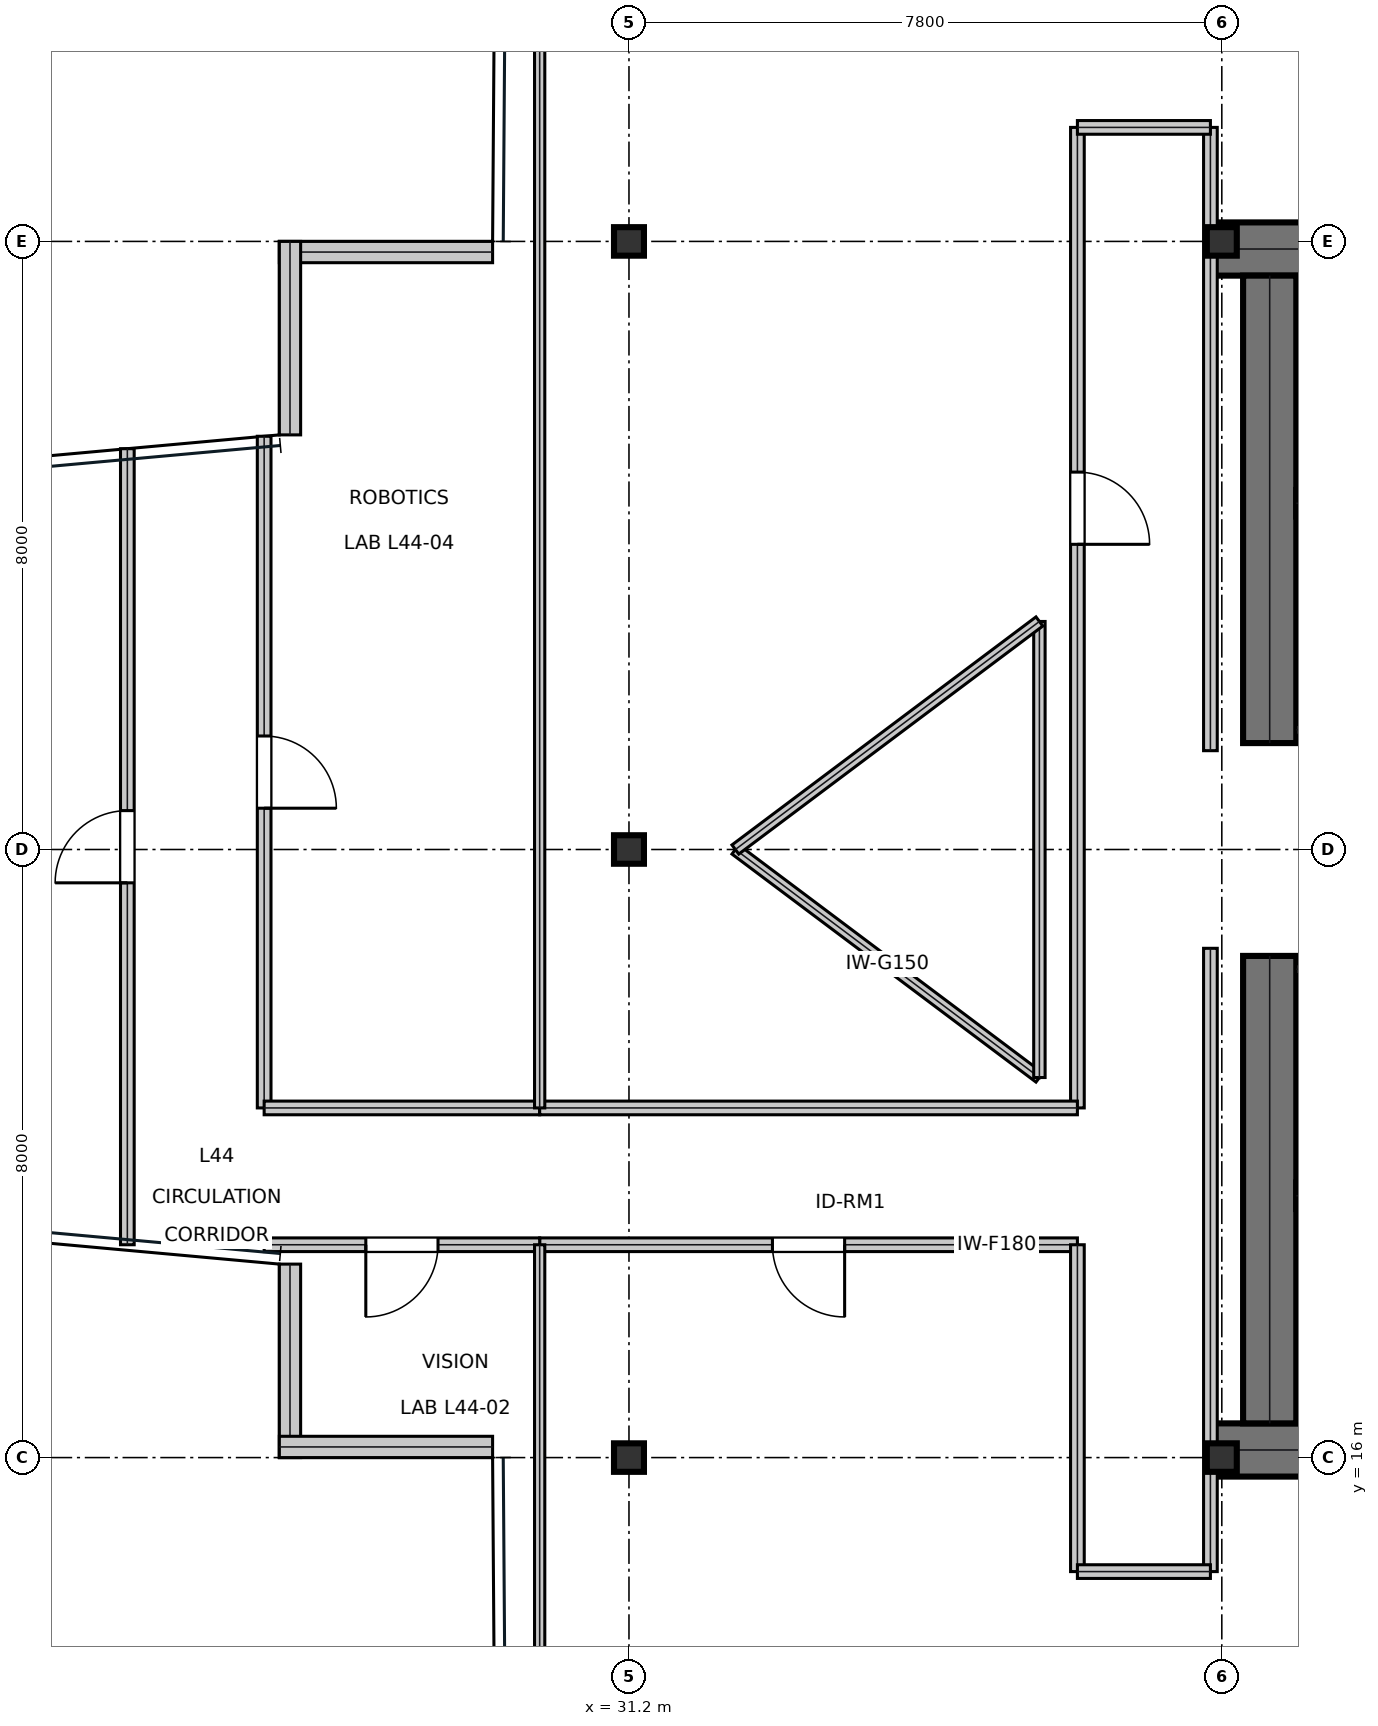
"""IFC4 building model, lengths in metres.
Left out: names, types, materials, properties, quantities, classifications, styles, units other than length and angle.
Written with IfcOpenShell. Run it as: python <this file> out.ifc"""

import sys

from ifc_helpers import new_model, si_unit, direction, frame, frame_2d, origin, origin_2d, place, context, subcontext, project, spatial, rectangle, i_section, extrude, element, fill, save


model = new_model("IFC4")
c1 = context("Model", 3, precision=1e-05, world=origin(), true_north=direction((0.0, 1.0)))
c2 = subcontext(c1, "Body", "Model", "MODEL_VIEW")
j1 = project(units=[si_unit("LENGTHUNIT", "METRE"), si_unit("PLANEANGLEUNIT", "RADIAN")], contexts=[c1])
p1 = place(None, origin())
s1 = spatial("IfcSite", under=j1, at=p1, CompositionType="ELEMENT")
p2 = place(p1, origin())
s2 = spatial("IfcBuilding", under=s1, at=p2, CompositionType="ELEMENT")
p3 = place(p2, frame((0.0, 0.0, 191.85)))
s3 = spatial("IfcBuildingStorey", under=s2, at=p3, CompositionType="ELEMENT", Elevation=191.85)
for number, where, z_axis, x_axis in (
    (1, (38.8, 31.9, 0.0), (0.0, 0.0, 1.0), (1.0, 0.0, 0.0)),
    (2, (38.8, 16.1, 0.0), (0.0, 0.0, 1.0), (1.0, 0.0, 0.0)),
):
    element("IfcWall", number, at=place(p3, frame(where, z_axis=z_axis, x_axis=x_axis)), inside=s3, PredefinedType="SHEAR", context=c2, shape_type="SweptSolid", body=[
        extrude(rectangle(XDim=16.0, YDim=0.7, at=frame_2d((8.0, 0.0))), origin(), (0.0, 0.0, 1.0), 3.79),
    ])
for number, where, z_axis, x_axis in (
    (3, (39.63, 16.45, 0.0), (0.0, 0.0, 1.0), (0.0, 1.0, 0.0)),
    (4, (39.63, 25.4, 0.0), (0.0, 0.0, 1.0), (0.0, 1.0, 0.0)),
):
    element("IfcWall", number, at=place(p3, frame(where, z_axis=z_axis, x_axis=x_axis)), inside=s3, PredefinedType="SHEAR", context=c2, shape_type="SweptSolid", body=[
        extrude(rectangle(XDim=6.15, YDim=0.7, at=frame_2d((3.075, 0.0))), origin(), (0.0, 0.0, 1.0), 3.79),
    ])
p4 = place(p3, frame((39.98, 28.555, 0.0), z_axis=(0.0, 0.0, 1.0), x_axis=(1.0, 0.0, 0.0)))
e5 = element("IfcWall", 5, at=p4, inside=s3, PredefinedType="SHEAR", context=c2, shape_type="SweptSolid", body=[
    extrude(rectangle(XDim=7.71, YDim=0.35, at=frame_2d((3.855, 0.0))), origin(), (0.0, 0.0, 1.0), 3.79),
])
p5 = place(p4, frame((0.25, 0.0, 0.0)))
e6 = element("IfcOpeningElement", 6, at=p5, cuts=e5, PredefinedType="OPENING", context=c2, shape_type="SweptSolid", body=[
    extrude(rectangle(XDim=1.1, YDim=2.15, at=frame_2d((0.55, 1.075))), frame((0.0, 0.185, 0.0), z_axis=(0.0, -1.0, 0.0), x_axis=(1.0, 0.0, 0.0)), (0.0, 0.0, 1.0), 0.37),
])
p6 = place(p3, frame((39.98, 19.445, 0.0), z_axis=(0.0, 0.0, 1.0), x_axis=(1.0, 0.0, 0.0)))
e7 = element("IfcWall", 7, at=p6, inside=s3, PredefinedType="SHEAR", context=c2, shape_type="SweptSolid", body=[
    extrude(rectangle(XDim=7.71, YDim=0.35, at=frame_2d((3.855, 0.0))), origin(), (0.0, 0.0, 1.0), 3.79),
])
p7 = place(p6, frame((0.25, 0.0, 0.0)))
e8 = element("IfcOpeningElement", 8, at=p7, cuts=e7, PredefinedType="OPENING", context=c2, shape_type="SweptSolid", body=[
    extrude(rectangle(XDim=1.1, YDim=2.15, at=frame_2d((0.55, 1.075))), frame((0.0, 0.185, 0.0), z_axis=(0.0, -1.0, 0.0), x_axis=(1.0, 0.0, 0.0)), (0.0, 0.0, 1.0), 0.37),
])
for number, where, z_axis, x_axis in (
    (9, (31.2, 16.0, 0.0), (0.0, 0.0, 1.0), (1.0, 0.0, 0.0)),
    (10, (31.2, 24.0, 0.0), (0.0, 0.0, 1.0), (1.0, 0.0, 0.0)),
    (11, (31.2, 32.0, 0.0), (0.0, 0.0, 1.0), (1.0, 0.0, 0.0)),
    (12, (39.0, 16.0, 0.0), (0.0, 0.0, 1.0), (1.0, 0.0, 0.0)),
    (13, (39.0, 32.0, 0.0), (0.0, 0.0, 1.0), (1.0, 0.0, 0.0)),
):
    element("IfcColumn", number, at=place(p3, frame(where, z_axis=z_axis, x_axis=x_axis)), inside=s3, PredefinedType="COLUMN", context=c2, shape_type="SweptSolid", body=[
        extrude(i_section(OverallWidth=0.394, OverallDepth=0.375, WebThickness=0.017, FlangeThickness=0.028, at=origin_2d()), origin(), (0.0, 0.0, 1.0), 4.044),
    ])
p8 = place(p3, frame((29.406, 31.86, 0.0), z_axis=(0.0, 0.0, 1.0), x_axis=(-1.0, 0.0, 0.0)))
e14 = element("IfcWall", 14, at=p8, inside=s3, PredefinedType="STANDARD", context=c2, shape_type="SweptSolid", body=[
    extrude(rectangle(XDim=2.806, YDim=0.28, at=frame_2d((1.403, 0.0))), origin(), (0.0, 0.0, 1.0), 3.79),
])
for number, where, z_axis, x_axis in (
    (15, (26.74, 32.0, 0.0), (0.0, 0.0, 1.0), (0.0, -1.0, 0.0)),
    (16, (26.74, 18.545, 0.0), (0.0, 0.0, 1.0), (0.0, -1.0, 0.0)),
):
    element("IfcWall", number, at=place(p3, frame(where, z_axis=z_axis, x_axis=x_axis)), inside=s3, PredefinedType="STANDARD", context=c2, shape_type="SweptSolid", body=[
        extrude(rectangle(XDim=2.545, YDim=0.28, at=frame_2d((1.273, 0.0))), origin(), (0.0, 0.0, 1.0), 3.319),
    ])
p9 = place(p3, frame((26.6, 16.14, 0.0), z_axis=(0.0, 0.0, 1.0), x_axis=(1.0, 0.0, 0.0)))
e17 = element("IfcWall", 17, at=p9, inside=s3, PredefinedType="STANDARD", context=c2, shape_type="SweptSolid", body=[
    extrude(rectangle(XDim=2.806, YDim=0.28, at=frame_2d((1.403, 0.0))), origin(), (0.0, 0.0, 1.0), 3.79),
])
p10 = place(p3, frame((39.98, 25.575, 0.0), z_axis=(0.0, 0.0, 1.0), x_axis=(1.0, 0.0, 0.0)))
e18 = element("IfcWall", 18, at=p10, inside=s3, PredefinedType="PARTITIONING", context=c2, shape_type="SweptSolid", body=[
    extrude(rectangle(XDim=5.9, YDim=0.15, at=frame_2d((2.95, 0.0))), origin(), (0.0, 0.0, 1.0), 3.79),
])
p11 = place(p10, frame((2.35, 0.0, 0.0)))
e19 = element("IfcOpeningElement", 19, at=p11, cuts=e18, PredefinedType="OPENING", context=c2, shape_type="SweptSolid", body=[
    extrude(rectangle(XDim=1.05, YDim=2.15, at=frame_2d((0.525, 1.075))), frame((0.0, 0.085, 0.0), z_axis=(0.0, -1.0, 0.0), x_axis=(1.0, 0.0, 0.0)), (0.0, 0.0, 1.0), 0.17),
])
p12 = place(p3, frame((39.98, 22.425, 0.0), z_axis=(0.0, 0.0, 1.0), x_axis=(1.0, 0.0, 0.0)))
e20 = element("IfcWall", 20, at=p12, inside=s3, PredefinedType="PARTITIONING", context=c2, shape_type="SweptSolid", body=[
    extrude(rectangle(XDim=5.9, YDim=0.15, at=frame_2d((2.95, 0.0))), origin(), (0.0, 0.0, 1.0), 3.79),
])
p13 = place(p12, frame((2.35, 0.0, 0.0)))
e21 = element("IfcOpeningElement", 21, at=p13, cuts=e20, PredefinedType="OPENING", context=c2, shape_type="SweptSolid", body=[
    extrude(rectangle(XDim=1.05, YDim=2.15, at=frame_2d((0.525, 1.075))), frame((0.0, 0.085, 0.0), z_axis=(0.0, -1.0, 0.0), x_axis=(1.0, 0.0, 0.0)), (0.0, 0.0, 1.0), 0.17),
])
p14 = place(p3, frame((30.025, 18.8, 0.0), z_axis=(0.0, 0.0, 1.0), x_axis=(1.0, 0.0, 0.0)))
e22 = element("IfcWall", 22, at=p14, inside=s3, PredefinedType="SOLIDWALL", context=c2, shape_type="SweptSolid", body=[
    extrude(rectangle(XDim=7.075, YDim=0.18, at=frame_2d((3.538, 0.0))), origin(), (0.0, 0.0, 1.0), 3.241),
])
p15 = place(p14, frame((3.062, 0.0, 0.0)))
e23 = element("IfcOpeningElement", 23, at=p15, cuts=e22, PredefinedType="OPENING", context=c2, shape_type="SweptSolid", body=[
    extrude(rectangle(XDim=0.95, YDim=2.15, at=frame_2d((0.475, 1.075))), frame((0.0, 0.1, 0.0), z_axis=(0.0, -1.0, 0.0), x_axis=(1.0, 0.0, 0.0)), (0.0, 0.0, 1.0), 0.2),
])
p16 = place(p3, frame((26.4, 18.8, 0.0), z_axis=(0.0, 0.0, 1.0), x_axis=(1.0, 0.0, 0.0)))
e24 = element("IfcWall", 24, at=p16, inside=s3, PredefinedType="SOLIDWALL", context=c2, shape_type="SweptSolid", body=[
    extrude(rectangle(XDim=3.625, YDim=0.18, at=frame_2d((1.812, 0.0))), origin(), (0.0, 0.0, 1.0), 3.79),
])
p17 = place(p16, frame((1.337, 0.0, 0.0)))
e25 = element("IfcOpeningElement", 25, at=p17, cuts=e24, PredefinedType="OPENING", context=c2, shape_type="SweptSolid", body=[
    extrude(rectangle(XDim=0.95, YDim=2.15, at=frame_2d((0.475, 1.075))), frame((0.0, 0.1, 0.0), z_axis=(0.0, -1.0, 0.0), x_axis=(1.0, 0.0, 0.0)), (0.0, 0.0, 1.0), 0.2),
])
p18 = place(p3, frame((24.6, 18.8, 0.0), z_axis=(0.0, 0.0, 1.0), x_axis=(0.0, 1.0, 0.0)))
e26 = element("IfcWall", 26, at=p18, inside=s3, PredefinedType="SOLIDWALL", context=c2, shape_type="SweptSolid", body=[
    extrude(rectangle(XDim=10.473, YDim=0.18, at=frame_2d((5.237, 0.0))), origin(), (0.0, 0.0, 1.0), 3.241),
])
p19 = place(p18, frame((4.761, 0.0, 0.0)))
e27 = element("IfcOpeningElement", 27, at=p19, cuts=e26, PredefinedType="OPENING", context=c2, shape_type="SweptSolid", body=[
    extrude(rectangle(XDim=0.95, YDim=2.15, at=frame_2d((0.475, 1.075))), frame((0.0, 0.1, 0.0), z_axis=(0.0, -1.0, 0.0), x_axis=(1.0, 0.0, 0.0)), (0.0, 0.0, 1.0), 0.2),
])
p20 = place(p3, frame((26.4, 20.6, 0.0), z_axis=(0.0, 0.0, 1.0), x_axis=(0.0, 1.0, 0.0)))
e28 = element("IfcWall", 28, at=p20, inside=s3, PredefinedType="SOLIDWALL", context=c2, shape_type="SweptSolid", body=[
    extrude(rectangle(XDim=8.836, YDim=0.18, at=frame_2d((4.418, 0.0))), origin(), (0.0, 0.0, 1.0), 3.241),
])
p21 = place(p20, frame((3.943, 0.0, 0.0)))
e29 = element("IfcOpeningElement", 29, at=p21, cuts=e28, PredefinedType="OPENING", context=c2, shape_type="SweptSolid", body=[
    extrude(rectangle(XDim=0.95, YDim=2.15, at=frame_2d((0.475, 1.075))), frame((0.0, 0.1, 0.0), z_axis=(0.0, -1.0, 0.0), x_axis=(1.0, 0.0, 0.0)), (0.0, 0.0, 1.0), 0.2),
])
p22 = place(p3, frame((37.1, 20.6, 0.0), z_axis=(0.0, 0.0, 1.0), x_axis=(0.0, 1.0, 0.0)))
e30 = element("IfcWall", 30, at=p22, inside=s3, PredefinedType="SOLIDWALL", context=c2, shape_type="SweptSolid", body=[
    extrude(rectangle(XDim=12.9, YDim=0.18, at=frame_2d((6.45, 0.0))), origin(), (0.0, 0.0, 1.0), 3.241),
])
p23 = place(p22, frame((7.415, 0.0, 0.0)))
e31 = element("IfcOpeningElement", 31, at=p23, cuts=e30, PredefinedType="OPENING", context=c2, shape_type="SweptSolid", body=[
    extrude(rectangle(XDim=0.95, YDim=2.15, at=frame_2d((0.475, 1.075))), frame((0.0, 0.1, 0.0), z_axis=(0.0, -1.0, 0.0), x_axis=(1.0, 0.0, 0.0)), (0.0, 0.0, 1.0), 0.2),
])
p24 = place(p3, frame((38.85, 14.5, 0.0), z_axis=(0.0, 0.0, 1.0), x_axis=(0.0, 1.0, 0.0)))
e32 = element("IfcWall", 32, at=p24, inside=s3, PredefinedType="SOLIDWALL", context=c2, shape_type="SweptSolid", body=[
    extrude(rectangle(XDim=8.2, YDim=0.18, at=frame_2d((4.1, 0.0))), origin(), (0.0, 0.0, 1.0), 3.241),
])
p25 = place(p3, frame((37.1, 14.5, 0.0), z_axis=(0.0, 0.0, 1.0), x_axis=(0.0, 1.0, 0.0)))
e33 = element("IfcWall", 33, at=p25, inside=s3, PredefinedType="SOLIDWALL", context=c2, shape_type="SweptSolid", body=[
    extrude(rectangle(XDim=4.3, YDim=0.18, at=frame_2d((2.15, 0.0))), origin(), (0.0, 0.0, 1.0), 3.241),
])
p26 = place(p3, frame((37.1, 14.5, 0.0), z_axis=(0.0, 0.0, 1.0), x_axis=(1.0, 0.0, 0.0)))
e34 = element("IfcWall", 34, at=p26, inside=s3, PredefinedType="SOLIDWALL", context=c2, shape_type="SweptSolid", body=[
    extrude(rectangle(XDim=1.75, YDim=0.18, at=frame_2d((0.875, 0.0))), origin(), (0.0, 0.0, 1.0), 3.241),
])
p27 = place(p3, frame((26.4, 20.6, 0.0), z_axis=(0.0, 0.0, 1.0), x_axis=(1.0, 0.0, 0.0)))
e35 = element("IfcWall", 35, at=p27, inside=s3, PredefinedType="SOLIDWALL", context=c2, shape_type="SweptSolid", body=[
    extrude(rectangle(XDim=3.625, YDim=0.18, at=frame_2d((1.812, 0.0))), origin(), (0.0, 0.0, 1.0), 3.79),
])
p28 = place(p3, frame((38.85, 25.3, 0.0), z_axis=(0.0, 0.0, 1.0), x_axis=(0.0, 1.0, 0.0)))
e36 = element("IfcWall", 36, at=p28, inside=s3, PredefinedType="SOLIDWALL", context=c2, shape_type="SweptSolid", body=[
    extrude(rectangle(XDim=8.2, YDim=0.18, at=frame_2d((4.1, 0.0))), origin(), (0.0, 0.0, 1.0), 3.241),
])
p29 = place(p3, frame((30.025, 20.6, 0.0), z_axis=(0.0, 0.0, 1.0), x_axis=(1.0, 0.0, 0.0)))
e37 = element("IfcWall", 37, at=p29, inside=s3, PredefinedType="SOLIDWALL", context=c2, shape_type="SweptSolid", body=[
    extrude(rectangle(XDim=7.075, YDim=0.18, at=frame_2d((3.538, 0.0))), origin(), (0.0, 0.0, 1.0), 3.241),
])
p30 = place(p3, frame((37.1, 33.5, 0.0), z_axis=(0.0, 0.0, 1.0), x_axis=(1.0, 0.0, 0.0)))
e38 = element("IfcWall", 38, at=p30, inside=s3, PredefinedType="SOLIDWALL", context=c2, shape_type="SweptSolid", body=[
    extrude(rectangle(XDim=1.75, YDim=0.18, at=frame_2d((0.875, 0.0))), origin(), (0.0, 0.0, 1.0), 3.241),
])
p31 = place(p3, frame((30.025, 7.805, 0.0), z_axis=(0.0, 0.0, 1.0), x_axis=(0.0, 1.0, 0.0)))
e39 = element("IfcWall", 39, at=p31, inside=s3, PredefinedType="PARTITIONING", context=c2, shape_type="SweptSolid", body=[
    extrude(rectangle(XDim=10.995, YDim=0.135, at=frame_2d((5.498, 0.0))), origin(), (0.0, 0.0, 1.0), 3.319),
])
p32 = place(p3, frame((30.025, 20.6, 0.0), z_axis=(0.0, 0.0, 1.0), x_axis=(0.0, 1.0, 0.0)))
e40 = element("IfcWall", 40, at=p32, inside=s3, PredefinedType="PARTITIONING", context=c2, shape_type="SweptSolid", body=[
    extrude(rectangle(XDim=19.595, YDim=0.135, at=frame_2d((9.797, 0.0))), origin(), (0.0, 0.0, 1.0), 3.241),
])
p33 = place(p3, frame((32.6, 24.0, 0.0), z_axis=(0.0, 0.0, 1.0), x_axis=(0.8, -0.6, 0.0)))
e41 = element("IfcWall", 41, at=p33, inside=s3, PredefinedType="MOVABLE", context=c2, shape_type="SweptSolid", body=[
    extrude(rectangle(XDim=5.0, YDim=0.15, at=frame_2d((2.5, 0.0))), origin(), (0.0, 0.0, 1.0), 3.79),
])
p34 = place(p3, frame((36.6, 21.0, 0.0), z_axis=(0.0, 0.0, 1.0), x_axis=(0.0, 1.0, 0.0)))
e42 = element("IfcWall", 42, at=p34, inside=s3, PredefinedType="MOVABLE", context=c2, shape_type="SweptSolid", body=[
    extrude(rectangle(XDim=6.0, YDim=0.15, at=frame_2d((3.0, 0.0))), origin(), (0.0, 0.0, 1.0), 3.79),
])
p35 = place(p3, frame((36.6, 27.0, 0.0), z_axis=(0.0, 0.0, 1.0), x_axis=(-0.8, -0.6, 0.0)))
e43 = element("IfcWall", 43, at=p35, inside=s3, PredefinedType="MOVABLE", context=c2, shape_type="SweptSolid", body=[
    extrude(rectangle(XDim=5.0, YDim=0.15, at=frame_2d((2.5, 0.0))), origin(), (0.0, 0.0, 1.0), 3.79),
])
p36 = place(p15, frame((0.95, 0.0, 0.0), z_axis=(0.0, 0.0, 1.0), x_axis=(-1.0, 0.0, 0.0)))
e44 = element("IfcDoor", 44, at=p36, inside=s3, OperationType="SINGLE_SWING_LEFT", PredefinedType="DOOR", context=c2, shape_type="SweptSolid", body=[
    extrude(rectangle(XDim=0.95, YDim=2.15, at=frame_2d((0.475, 1.075))), frame((0.0, 0.025, 0.0), z_axis=(0.0, -1.0, 0.0), x_axis=(1.0, 0.0, 0.0)), (0.0, 0.0, 1.0), 0.05),
])
fill(e23, e44)
p37 = place(p17, frame((0.95, 0.0, 0.0), z_axis=(0.0, 0.0, 1.0), x_axis=(-1.0, 0.0, 0.0)))
e45 = element("IfcDoor", 45, at=p37, inside=s3, OperationType="SINGLE_SWING_RIGHT", PredefinedType="DOOR", context=c2, shape_type="SweptSolid", body=[
    extrude(rectangle(XDim=0.95, YDim=2.15, at=frame_2d((0.475, 1.075))), frame((0.0, 0.025, 0.0), z_axis=(0.0, -1.0, 0.0), x_axis=(1.0, 0.0, 0.0)), (0.0, 0.0, 1.0), 0.05),
])
fill(e25, e45)
p38 = place(p19, origin())
e46 = element("IfcDoor", 46, at=p38, inside=s3, OperationType="SINGLE_SWING_LEFT", PredefinedType="DOOR", context=c2, shape_type="SweptSolid", body=[
    extrude(rectangle(XDim=0.95, YDim=2.15, at=frame_2d((0.475, 1.075))), frame((0.0, 0.025, 0.0), z_axis=(0.0, -1.0, 0.0), x_axis=(1.0, 0.0, 0.0)), (0.0, 0.0, 1.0), 0.05),
])
fill(e27, e46)
p39 = place(p21, frame((0.95, 0.0, 0.0), z_axis=(0.0, 0.0, 1.0), x_axis=(-1.0, 0.0, 0.0)))
e47 = element("IfcDoor", 47, at=p39, inside=s3, OperationType="SINGLE_SWING_RIGHT", PredefinedType="DOOR", context=c2, shape_type="SweptSolid", body=[
    extrude(rectangle(XDim=0.95, YDim=2.15, at=frame_2d((0.475, 1.075))), frame((0.0, 0.025, 0.0), z_axis=(0.0, -1.0, 0.0), x_axis=(1.0, 0.0, 0.0)), (0.0, 0.0, 1.0), 0.05),
])
fill(e29, e47)
p40 = place(p23, frame((0.95, 0.0, 0.0), z_axis=(0.0, 0.0, 1.0), x_axis=(-1.0, 0.0, 0.0)))
e48 = element("IfcDoor", 48, at=p40, inside=s3, OperationType="SINGLE_SWING_RIGHT", PredefinedType="DOOR", context=c2, shape_type="SweptSolid", body=[
    extrude(rectangle(XDim=0.95, YDim=2.15, at=frame_2d((0.475, 1.075))), frame((0.0, 0.025, 0.0), z_axis=(0.0, -1.0, 0.0), x_axis=(1.0, 0.0, 0.0)), (0.0, 0.0, 1.0), 0.05),
])
fill(e31, e48)
save(model, sys.argv[1])
